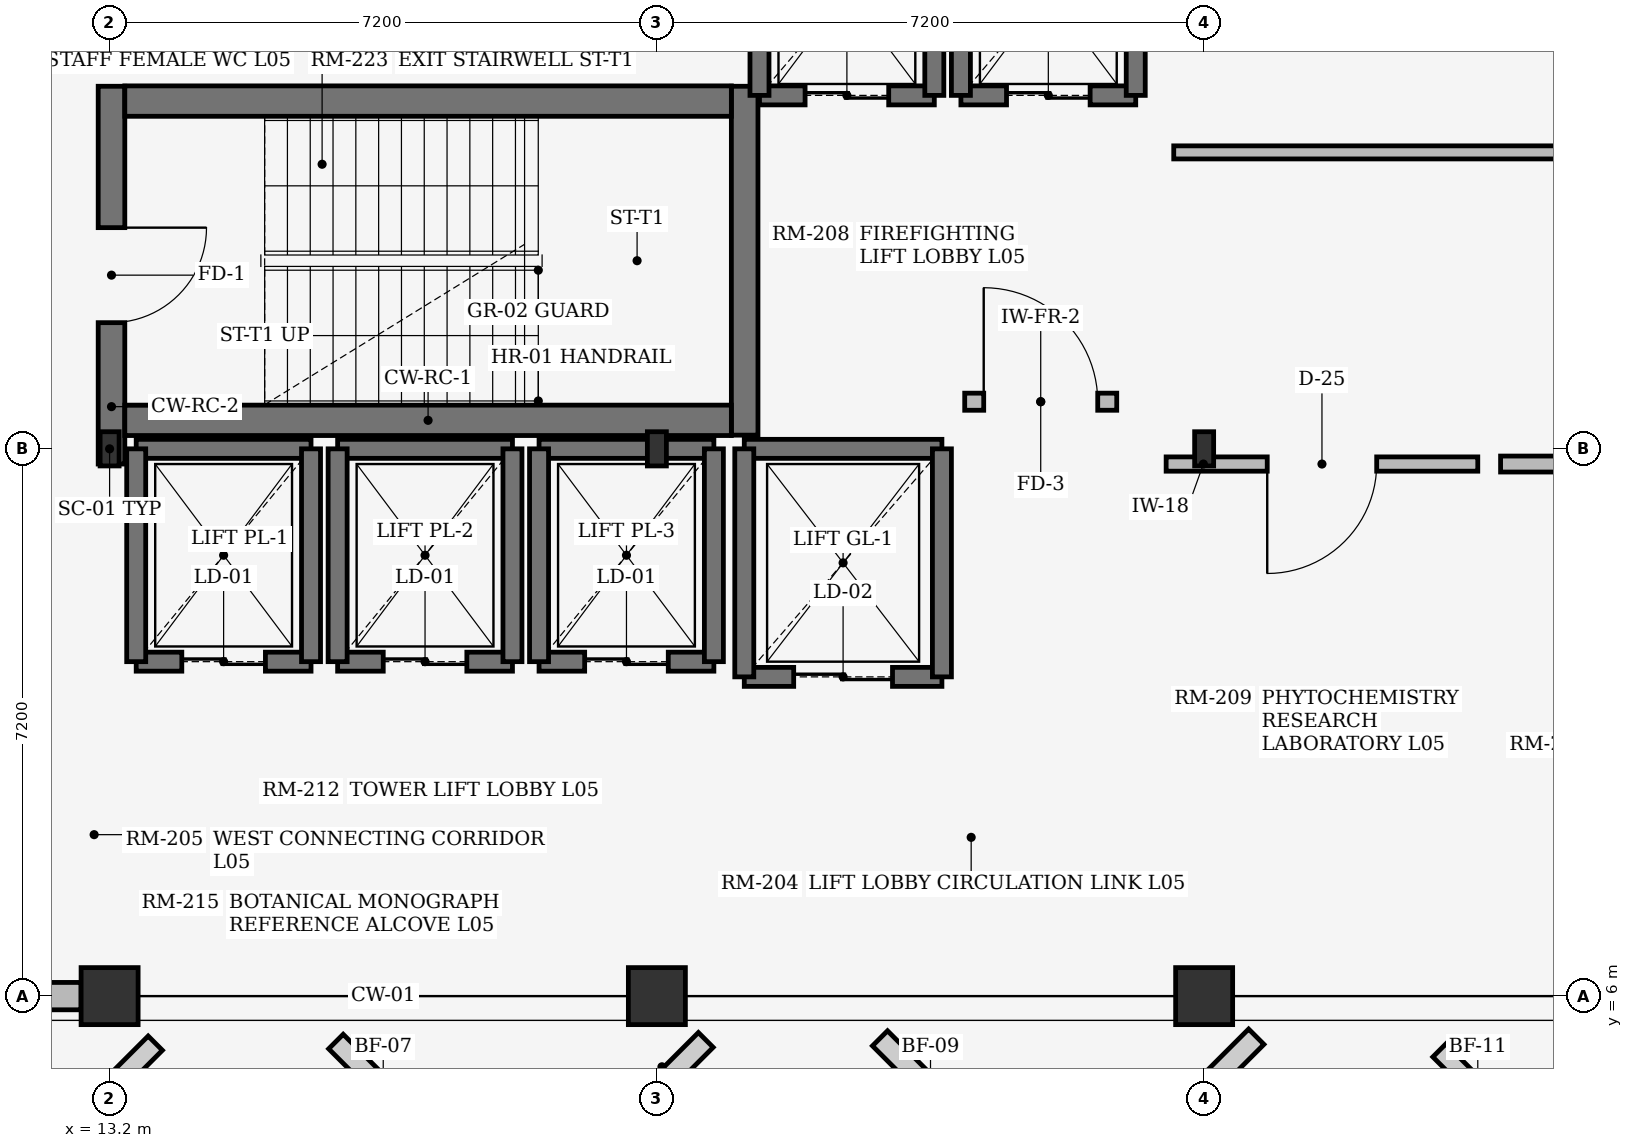
"""IFC4 building model, lengths in metres.
Left out: names, types, materials, properties, quantities, classifications, styles, units other than length and angle.
Written with IfcOpenShell. Run it as: python <this file> out.ifc"""

import sys

from ifc_helpers import new_model, si_unit, direction, frame, frame_2d, origin, origin_2d, place, context, subcontext, project, spatial, rectangle, i_section, extrude, element, fill, save


model = new_model("IFC4")
c1 = context("Model", 3, precision=1e-05, world=origin(), true_north=direction((0.0, 1.0)))
c2 = subcontext(c1, "Body", "Model", "MODEL_VIEW")
j1 = project(units=[si_unit("LENGTHUNIT", "METRE"), si_unit("PLANEANGLEUNIT", "RADIAN")], contexts=[c1])
p1 = place(None, origin())
s1 = spatial("IfcSite", under=j1, at=p1, CompositionType="ELEMENT")
p2 = place(p1, origin())
s2 = spatial("IfcBuilding", under=s1, at=p2, CompositionType="ELEMENT")
p3 = place(p2, frame((0.0, 0.0, 21.0)))
s3 = spatial("IfcBuildingStorey", under=s2, at=p3, CompositionType="ELEMENT", Elevation=21.0)
p4 = place(p3, frame((13.2, 6.0, 0.0), z_axis=(0.0, 0.0, 1.0), x_axis=(1.0, 0.0, 0.0)))
e1 = element("IfcColumn", 1, at=p4, inside=s3, PredefinedType="COLUMN", context=c2, shape_type="SweptSolid", body=[
    extrude(rectangle(XDim=0.75, YDim=0.75, at=origin_2d()), origin(), (0.0, 0.0, 1.0), 3.67),
])
p5 = place(p3, frame((13.2, 13.2, 0.0), z_axis=(0.0, 0.0, 1.0), x_axis=(1.0, 0.0, 0.0)))
e2 = element("IfcColumn", 2, at=p5, inside=s3, PredefinedType="COLUMN", context=c2, shape_type="SweptSolid", body=[
    extrude(i_section(OverallWidth=0.25, OverallDepth=0.45, WebThickness=0.011, FlangeThickness=0.014, at=origin_2d()), origin(), (0.0, 0.0, 1.0), 3.67),
])
p6 = place(p3, frame((20.4, 6.0, 0.0), z_axis=(0.0, 0.0, 1.0), x_axis=(1.0, 0.0, 0.0)))
e3 = element("IfcColumn", 3, at=p6, inside=s3, PredefinedType="COLUMN", context=c2, shape_type="SweptSolid", body=[
    extrude(rectangle(XDim=0.75, YDim=0.75, at=origin_2d()), origin(), (0.0, 0.0, 1.0), 3.67),
])
p7 = place(p3, frame((20.4, 13.2, 0.0), z_axis=(0.0, 0.0, 1.0), x_axis=(1.0, 0.0, 0.0)))
e4 = element("IfcColumn", 4, at=p7, inside=s3, PredefinedType="COLUMN", context=c2, shape_type="SweptSolid", body=[
    extrude(i_section(OverallWidth=0.25, OverallDepth=0.45, WebThickness=0.011, FlangeThickness=0.014, at=origin_2d()), origin(), (0.0, 0.0, 1.0), 3.67),
])
p8 = place(p3, frame((27.6, 6.0, 0.0), z_axis=(0.0, 0.0, 1.0), x_axis=(1.0, 0.0, 0.0)))
e5 = element("IfcColumn", 5, at=p8, inside=s3, PredefinedType="COLUMN", context=c2, shape_type="SweptSolid", body=[
    extrude(rectangle(XDim=0.75, YDim=0.75, at=origin_2d()), origin(), (0.0, 0.0, 1.0), 3.67),
])
p9 = place(p3, frame((27.6, 13.2, 0.0), z_axis=(0.0, 0.0, 1.0), x_axis=(1.0, 0.0, 0.0)))
e6 = element("IfcColumn", 6, at=p9, inside=s3, PredefinedType="COLUMN", context=c2, shape_type="SweptSolid", body=[
    extrude(i_section(OverallWidth=0.25, OverallDepth=0.45, WebThickness=0.011, FlangeThickness=0.014, at=origin_2d()), origin(), (0.0, 0.0, 1.0), 3.67),
])
p10 = place(p3, frame((6.375, 6.0, 0.0), z_axis=(0.0, 0.0, 1.0), x_axis=(1.0, 0.0, 0.0)))
e7 = element("IfcWall", 7, at=p10, inside=s3, PredefinedType="STANDARD", context=c2, shape_type="SweptSolid", body=[
    extrude(rectangle(XDim=6.45, YDim=0.36, at=frame_2d((3.225, 0.0))), origin(), (0.0, 0.0, 1.0), 3.05),
])
p11 = place(p10, frame((2.65, 0.0, 0.75)))
e8 = element("IfcOpeningElement", 8, at=p11, cuts=e7, PredefinedType="OPENING", context=c2, shape_type="SweptSolid", body=[
    extrude(rectangle(XDim=1.15, YDim=1.35, at=frame_2d((0.575, 0.675))), frame((0.0, 0.19, 0.0), z_axis=(0.0, -1.0, 0.0), x_axis=(1.0, 0.0, 0.0)), (0.0, 0.0, 1.0), 0.38),
])
p12 = place(p3, frame((13.225, 13.0, 0.0), z_axis=(0.0, 0.0, 1.0), x_axis=(0.0, 1.0, 0.0)))
e9 = element("IfcWall", 9, at=p12, inside=s3, PredefinedType="SHEAR", context=c2, shape_type="SweptSolid", body=[
    extrude(rectangle(XDim=4.97, YDim=0.35, at=frame_2d((2.485, 0.0))), origin(), (0.0, 0.0, 1.0), 3.67),
])
p13 = place(p12, frame((1.86, 0.0, 0.0)))
e10 = element("IfcOpeningElement", 10, at=p13, cuts=e9, PredefinedType="OPENING", context=c2, shape_type="SweptSolid", body=[
    extrude(rectangle(XDim=1.25, YDim=2.2, at=frame_2d((0.625, 1.1))), frame((0.0, 0.185, 0.0), z_axis=(0.0, -1.0, 0.0), x_axis=(1.0, 0.0, 0.0)), (0.0, 0.0, 1.0), 0.37),
])
p14 = place(p3, frame((21.555, 13.38, 0.0), z_axis=(0.0, 0.0, 1.0), x_axis=(0.0, 1.0, 0.0)))
e11 = element("IfcWall", 11, at=p14, inside=s3, PredefinedType="SHEAR", context=c2, shape_type="SweptSolid", body=[
    extrude(rectangle(XDim=4.59, YDim=0.35, at=frame_2d((2.295, 0.0))), origin(), (0.0, 0.0, 1.0), 3.67),
])
for number, where, z_axis, x_axis in (
    (12, (13.4, 13.575, 0.0), (0.0, 0.0, 1.0), (1.0, 0.0, 0.0)),
    (13, (13.4, 17.775, 0.0), (0.0, 0.0, 1.0), (1.0, 0.0, 0.0)),
):
    element("IfcWall", number, at=place(p3, frame(where, z_axis=z_axis, x_axis=x_axis)), inside=s3, PredefinedType="SHEAR", context=c2, shape_type="SweptSolid", body=[
        extrude(rectangle(XDim=7.98, YDim=0.4, at=frame_2d((3.99, 0.0))), origin(), (0.0, 0.0, 1.0), 3.67),
    ])
p15 = place(p3, frame((21.75, 17.85, 0.0), z_axis=(0.0, 0.0, 1.0), x_axis=(1.0, 0.0, 0.0)))
e14 = element("IfcWall", 14, at=p15, inside=s3, PredefinedType="SHEAR", context=c2, shape_type="SweptSolid", body=[
    extrude(rectangle(XDim=2.3, YDim=0.25, at=frame_2d((1.15, 0.0))), origin(), (0.0, 0.0, 1.0), 3.67),
])
p16 = place(p15, frame((0.6, 0.0, 0.0)))
e15 = element("IfcOpeningElement", 15, at=p16, cuts=e14, PredefinedType="OPENING", context=c2, shape_type="SweptSolid", body=[
    extrude(rectangle(XDim=1.1, YDim=2.2, at=frame_2d((0.55, 1.1))), frame((0.0, 0.135, 0.0), z_axis=(0.0, -1.0, 0.0), x_axis=(1.0, 0.0, 0.0)), (0.0, 0.0, 1.0), 0.27),
])
for number, where, z_axis, x_axis in (
    (16, (21.75, 17.85, 0.0), (0.0, 0.0, 1.0), (0.0, 1.0, 0.0)),
    (17, (24.05, 17.85, 0.0), (0.0, 0.0, 1.0), (0.0, 1.0, 0.0)),
):
    element("IfcWall", number, at=place(p3, frame(where, z_axis=z_axis, x_axis=x_axis)), inside=s3, PredefinedType="SHEAR", context=c2, shape_type="SweptSolid", body=[
        extrude(rectangle(XDim=2.7, YDim=0.25, at=frame_2d((1.35, 0.0))), origin(), (0.0, 0.0, 1.0), 3.67),
    ])
p17 = place(p3, frame((24.4, 17.85, 0.0), z_axis=(0.0, 0.0, 1.0), x_axis=(1.0, 0.0, 0.0)))
e18 = element("IfcWall", 18, at=p17, inside=s3, PredefinedType="SHEAR", context=c2, shape_type="SweptSolid", body=[
    extrude(rectangle(XDim=2.3, YDim=0.25, at=frame_2d((1.15, 0.0))), origin(), (0.0, 0.0, 1.0), 3.67),
])
p18 = place(p17, frame((0.6, 0.0, 0.0)))
e19 = element("IfcOpeningElement", 19, at=p18, cuts=e18, PredefinedType="OPENING", context=c2, shape_type="SweptSolid", body=[
    extrude(rectangle(XDim=1.1, YDim=2.2, at=frame_2d((0.55, 1.1))), frame((0.0, 0.135, 0.0), z_axis=(0.0, -1.0, 0.0), x_axis=(1.0, 0.0, 0.0)), (0.0, 0.0, 1.0), 0.27),
])
for number, where, z_axis, x_axis in (
    (20, (24.4, 17.85, 0.0), (0.0, 0.0, 1.0), (0.0, 1.0, 0.0)),
    (21, (26.7, 17.85, 0.0), (0.0, 0.0, 1.0), (0.0, 1.0, 0.0)),
):
    element("IfcWall", number, at=place(p3, frame(where, z_axis=z_axis, x_axis=x_axis)), inside=s3, PredefinedType="SHEAR", context=c2, shape_type="SweptSolid", body=[
        extrude(rectangle(XDim=2.7, YDim=0.25, at=frame_2d((1.35, 0.0))), origin(), (0.0, 0.0, 1.0), 3.67),
    ])
p19 = place(p3, frame((13.55, 10.4, 0.0), z_axis=(0.0, 0.0, 1.0), x_axis=(1.0, 0.0, 0.0)))
e22 = element("IfcWall", 22, at=p19, inside=s3, PredefinedType="SHEAR", context=c2, shape_type="SweptSolid", body=[
    extrude(rectangle(XDim=2.3, YDim=0.25, at=frame_2d((1.15, 0.0))), origin(), (0.0, 0.0, 1.0), 3.67),
])
p20 = place(p19, frame((0.6, 0.0, 0.0)))
e23 = element("IfcOpeningElement", 23, at=p20, cuts=e22, PredefinedType="OPENING", context=c2, shape_type="SweptSolid", body=[
    extrude(rectangle(XDim=1.1, YDim=2.2, at=frame_2d((0.55, 1.1))), frame((0.0, 0.135, 0.0), z_axis=(0.0, -1.0, 0.0), x_axis=(1.0, 0.0, 0.0)), (0.0, 0.0, 1.0), 0.27),
])
p21 = place(p3, frame((13.55, 13.2, 0.0), z_axis=(0.0, 0.0, 1.0), x_axis=(1.0, 0.0, 0.0)))
e24 = element("IfcWall", 24, at=p21, inside=s3, PredefinedType="SHEAR", context=c2, shape_type="SweptSolid", body=[
    extrude(rectangle(XDim=2.3, YDim=0.25, at=frame_2d((1.15, 0.0))), origin(), (0.0, 0.0, 1.0), 3.67),
])
for number, where, z_axis, x_axis in (
    (25, (13.55, 10.4, 0.0), (0.0, 0.0, 1.0), (0.0, 1.0, 0.0)),
    (26, (15.85, 10.4, 0.0), (0.0, 0.0, 1.0), (0.0, 1.0, 0.0)),
):
    element("IfcWall", number, at=place(p3, frame(where, z_axis=z_axis, x_axis=x_axis)), inside=s3, PredefinedType="SHEAR", context=c2, shape_type="SweptSolid", body=[
        extrude(rectangle(XDim=2.8, YDim=0.25, at=frame_2d((1.4, 0.0))), origin(), (0.0, 0.0, 1.0), 3.67),
    ])
p22 = place(p3, frame((16.2, 10.4, 0.0), z_axis=(0.0, 0.0, 1.0), x_axis=(1.0, 0.0, 0.0)))
e27 = element("IfcWall", 27, at=p22, inside=s3, PredefinedType="SHEAR", context=c2, shape_type="SweptSolid", body=[
    extrude(rectangle(XDim=2.3, YDim=0.25, at=frame_2d((1.15, 0.0))), origin(), (0.0, 0.0, 1.0), 3.67),
])
p23 = place(p22, frame((0.6, 0.0, 0.0)))
e28 = element("IfcOpeningElement", 28, at=p23, cuts=e27, PredefinedType="OPENING", context=c2, shape_type="SweptSolid", body=[
    extrude(rectangle(XDim=1.1, YDim=2.2, at=frame_2d((0.55, 1.1))), frame((0.0, 0.135, 0.0), z_axis=(0.0, -1.0, 0.0), x_axis=(1.0, 0.0, 0.0)), (0.0, 0.0, 1.0), 0.27),
])
p24 = place(p3, frame((16.2, 13.2, 0.0), z_axis=(0.0, 0.0, 1.0), x_axis=(1.0, 0.0, 0.0)))
e29 = element("IfcWall", 29, at=p24, inside=s3, PredefinedType="SHEAR", context=c2, shape_type="SweptSolid", body=[
    extrude(rectangle(XDim=2.3, YDim=0.25, at=frame_2d((1.15, 0.0))), origin(), (0.0, 0.0, 1.0), 3.67),
])
for number, where, z_axis, x_axis in (
    (30, (16.2, 10.4, 0.0), (0.0, 0.0, 1.0), (0.0, 1.0, 0.0)),
    (31, (18.5, 10.4, 0.0), (0.0, 0.0, 1.0), (0.0, 1.0, 0.0)),
):
    element("IfcWall", number, at=place(p3, frame(where, z_axis=z_axis, x_axis=x_axis)), inside=s3, PredefinedType="SHEAR", context=c2, shape_type="SweptSolid", body=[
        extrude(rectangle(XDim=2.8, YDim=0.25, at=frame_2d((1.4, 0.0))), origin(), (0.0, 0.0, 1.0), 3.67),
    ])
p25 = place(p3, frame((18.85, 10.4, 0.0), z_axis=(0.0, 0.0, 1.0), x_axis=(1.0, 0.0, 0.0)))
e32 = element("IfcWall", 32, at=p25, inside=s3, PredefinedType="SHEAR", context=c2, shape_type="SweptSolid", body=[
    extrude(rectangle(XDim=2.3, YDim=0.25, at=frame_2d((1.15, 0.0))), origin(), (0.0, 0.0, 1.0), 3.67),
])
p26 = place(p25, frame((0.6, 0.0, 0.0)))
e33 = element("IfcOpeningElement", 33, at=p26, cuts=e32, PredefinedType="OPENING", context=c2, shape_type="SweptSolid", body=[
    extrude(rectangle(XDim=1.1, YDim=2.2, at=frame_2d((0.55, 1.1))), frame((0.0, 0.135, 0.0), z_axis=(0.0, -1.0, 0.0), x_axis=(1.0, 0.0, 0.0)), (0.0, 0.0, 1.0), 0.27),
])
p27 = place(p3, frame((18.85, 13.2, 0.0), z_axis=(0.0, 0.0, 1.0), x_axis=(1.0, 0.0, 0.0)))
e34 = element("IfcWall", 34, at=p27, inside=s3, PredefinedType="SHEAR", context=c2, shape_type="SweptSolid", body=[
    extrude(rectangle(XDim=2.3, YDim=0.25, at=frame_2d((1.15, 0.0))), origin(), (0.0, 0.0, 1.0), 3.67),
])
for number, where, z_axis, x_axis in (
    (35, (18.85, 10.4, 0.0), (0.0, 0.0, 1.0), (0.0, 1.0, 0.0)),
    (36, (21.15, 10.4, 0.0), (0.0, 0.0, 1.0), (0.0, 1.0, 0.0)),
):
    element("IfcWall", number, at=place(p3, frame(where, z_axis=z_axis, x_axis=x_axis)), inside=s3, PredefinedType="SHEAR", context=c2, shape_type="SweptSolid", body=[
        extrude(rectangle(XDim=2.8, YDim=0.25, at=frame_2d((1.4, 0.0))), origin(), (0.0, 0.0, 1.0), 3.67),
    ])
p28 = place(p3, frame((21.55, 10.2, 0.0), z_axis=(0.0, 0.0, 1.0), x_axis=(1.0, 0.0, 0.0)))
e37 = element("IfcWall", 37, at=p28, inside=s3, PredefinedType="SHEAR", context=c2, shape_type="SweptSolid", body=[
    extrude(rectangle(XDim=2.6, YDim=0.25, at=frame_2d((1.3, 0.0))), origin(), (0.0, 0.0, 1.0), 3.67),
])
p29 = place(p28, frame((0.65, 0.0, 0.0)))
e38 = element("IfcOpeningElement", 38, at=p29, cuts=e37, PredefinedType="OPENING", context=c2, shape_type="SweptSolid", body=[
    extrude(rectangle(XDim=1.3, YDim=2.25, at=frame_2d((0.65, 1.125))), frame((0.0, 0.135, 0.0), z_axis=(0.0, -1.0, 0.0), x_axis=(1.0, 0.0, 0.0)), (0.0, 0.0, 1.0), 0.27),
])
p30 = place(p3, frame((21.55, 13.2, 0.0), z_axis=(0.0, 0.0, 1.0), x_axis=(1.0, 0.0, 0.0)))
e39 = element("IfcWall", 39, at=p30, inside=s3, PredefinedType="SHEAR", context=c2, shape_type="SweptSolid", body=[
    extrude(rectangle(XDim=2.6, YDim=0.25, at=frame_2d((1.3, 0.0))), origin(), (0.0, 0.0, 1.0), 3.67),
])
for number, where, z_axis, x_axis in (
    (40, (21.55, 10.2, 0.0), (0.0, 0.0, 1.0), (0.0, 1.0, 0.0)),
    (41, (24.15, 10.2, 0.0), (0.0, 0.0, 1.0), (0.0, 1.0, 0.0)),
):
    element("IfcWall", number, at=place(p3, frame(where, z_axis=z_axis, x_axis=x_axis)), inside=s3, PredefinedType="SHEAR", context=c2, shape_type="SweptSolid", body=[
        extrude(rectangle(XDim=3.0, YDim=0.25, at=frame_2d((1.5, 0.0))), origin(), (0.0, 0.0, 1.0), 3.67),
    ])
p31 = place(p3, frame((24.45, 13.82, 0.0), z_axis=(0.0, 0.0, 1.0), x_axis=(1.0, 0.0, 0.0)))
e42 = element("IfcWall", 42, at=p31, inside=s3, PredefinedType="SOLIDWALL", context=c2, shape_type="SweptSolid", body=[
    extrude(rectangle(XDim=2.0, YDim=0.225, at=frame_2d((1.0, 0.0))), origin(), (0.0, 0.0, 1.0), 3.65),
])
p32 = place(p31, frame((0.25, 0.0, 0.0)))
e43 = element("IfcOpeningElement", 43, at=p32, cuts=e42, PredefinedType="OPENING", context=c2, shape_type="SweptSolid", body=[
    extrude(rectangle(XDim=1.5, YDim=2.2, at=frame_2d((0.75, 1.1))), frame((0.0, 0.123, 0.0), z_axis=(0.0, -1.0, 0.0), x_axis=(1.0, 0.0, 0.0)), (0.0, 0.0, 1.0), 0.245),
])
p33 = place(p3, frame((27.2, 17.1, 0.0), z_axis=(0.0, 0.0, 1.0), x_axis=(1.0, 0.0, 0.0)))
e44 = element("IfcWall", 44, at=p33, inside=s3, PredefinedType="PARTITIONING", context=c2, shape_type="SweptSolid", body=[
    extrude(rectangle(XDim=14.25, YDim=0.172, at=frame_2d((7.125, 0.0))), origin(), (0.0, 0.0, 1.0), 3.65),
])
p34 = place(p33, frame((6.455, 0.0, 0.0)))
e45 = element("IfcOpeningElement", 45, at=p34, cuts=e44, PredefinedType="OPENING", context=c2, shape_type="SweptSolid", body=[
    extrude(rectangle(XDim=1.34, YDim=2.22, at=frame_2d((0.67, 1.11))), frame((0.0, 0.096, 0.0), z_axis=(0.0, -1.0, 0.0), x_axis=(1.0, 0.0, 0.0)), (0.0, 0.0, 1.0), 0.192),
])
p35 = place(p3, frame((27.1, 13.0, 0.0), z_axis=(0.0, 0.0, 1.0), x_axis=(1.0, 0.0, 0.0)))
e46 = element("IfcWall", 46, at=p35, inside=s3, PredefinedType="PARTITIONING", context=c2, shape_type="SweptSolid", body=[
    extrude(rectangle(XDim=4.1, YDim=0.188, at=frame_2d((2.05, 0.0))), origin(), (0.0, 0.0, 1.0), 3.65),
])
p36 = place(p35, frame((1.33, 0.0, 0.0)))
e47 = element("IfcOpeningElement", 47, at=p36, cuts=e46, PredefinedType="OPENING", context=c2, shape_type="SweptSolid", body=[
    extrude(rectangle(XDim=1.44, YDim=2.24, at=frame_2d((0.72, 1.12))), frame((0.0, 0.104, 0.0), z_axis=(0.0, -1.0, 0.0), x_axis=(1.0, 0.0, 0.0)), (0.0, 0.0, 1.0), 0.208),
])
p37 = place(p3, frame((31.5, 13.0, 0.0), z_axis=(0.0, 0.0, 1.0), x_axis=(1.0, 0.0, 0.0)))
e48 = element("IfcWall", 48, at=p37, inside=s3, PredefinedType="PARTITIONING", context=c2, shape_type="SweptSolid", body=[
    extrude(rectangle(XDim=9.95, YDim=0.21, at=frame_2d((4.975, 0.0))), origin(), (0.0, 0.0, 1.0), 3.06),
])
p38 = place(p37, frame((4.215, 0.0, 0.0)))
e49 = element("IfcOpeningElement", 49, at=p38, cuts=e48, PredefinedType="OPENING", context=c2, shape_type="SweptSolid", body=[
    extrude(rectangle(XDim=1.52, YDim=2.26, at=frame_2d((0.76, 1.13))), frame((0.0, 0.115, 0.0), z_axis=(0.0, -1.0, 0.0), x_axis=(1.0, 0.0, 0.0)), (0.0, 0.0, 1.0), 0.23),
])
p39 = place(p13, origin())
e50 = element("IfcDoor", 50, at=p39, inside=s3, OperationType="SINGLE_SWING_RIGHT", PredefinedType="DOOR", context=c2, shape_type="SweptSolid", body=[
    extrude(rectangle(XDim=1.25, YDim=2.2, at=frame_2d((0.625, 1.1))), frame((0.0, 0.025, 0.0), z_axis=(0.0, -1.0, 0.0), x_axis=(1.0, 0.0, 0.0)), (0.0, 0.0, 1.0), 0.05),
])
fill(e10, e50)
p40 = place(p16, origin())
e51 = element("IfcDoor", 51, at=p40, inside=s3, OperationType="DOUBLE_DOOR_SLIDING", PredefinedType="DOOR", context=c2, shape_type="SweptSolid", body=[
    extrude(rectangle(XDim=1.1, YDim=2.2, at=frame_2d((0.55, 1.1))), frame((0.0, 0.025, 0.0), z_axis=(0.0, -1.0, 0.0), x_axis=(1.0, 0.0, 0.0)), (0.0, 0.0, 1.0), 0.05),
])
fill(e15, e51)
p41 = place(p18, origin())
e52 = element("IfcDoor", 52, at=p41, inside=s3, OperationType="DOUBLE_DOOR_SLIDING", PredefinedType="DOOR", context=c2, shape_type="SweptSolid", body=[
    extrude(rectangle(XDim=1.1, YDim=2.2, at=frame_2d((0.55, 1.1))), frame((0.0, 0.025, 0.0), z_axis=(0.0, -1.0, 0.0), x_axis=(1.0, 0.0, 0.0)), (0.0, 0.0, 1.0), 0.05),
])
fill(e19, e52)
p42 = place(p20, origin())
e53 = element("IfcDoor", 53, at=p42, inside=s3, OperationType="DOUBLE_DOOR_SLIDING", PredefinedType="DOOR", context=c2, shape_type="SweptSolid", body=[
    extrude(rectangle(XDim=1.1, YDim=2.2, at=frame_2d((0.55, 1.1))), frame((0.0, 0.025, 0.0), z_axis=(0.0, -1.0, 0.0), x_axis=(1.0, 0.0, 0.0)), (0.0, 0.0, 1.0), 0.05),
])
fill(e23, e53)
p43 = place(p23, origin())
e54 = element("IfcDoor", 54, at=p43, inside=s3, OperationType="DOUBLE_DOOR_SLIDING", PredefinedType="DOOR", context=c2, shape_type="SweptSolid", body=[
    extrude(rectangle(XDim=1.1, YDim=2.2, at=frame_2d((0.55, 1.1))), frame((0.0, 0.025, 0.0), z_axis=(0.0, -1.0, 0.0), x_axis=(1.0, 0.0, 0.0)), (0.0, 0.0, 1.0), 0.05),
])
fill(e28, e54)
p44 = place(p26, origin())
e55 = element("IfcDoor", 55, at=p44, inside=s3, OperationType="DOUBLE_DOOR_SLIDING", PredefinedType="DOOR", context=c2, shape_type="SweptSolid", body=[
    extrude(rectangle(XDim=1.1, YDim=2.2, at=frame_2d((0.55, 1.1))), frame((0.0, 0.025, 0.0), z_axis=(0.0, -1.0, 0.0), x_axis=(1.0, 0.0, 0.0)), (0.0, 0.0, 1.0), 0.05),
])
fill(e33, e55)
p45 = place(p29, origin())
e56 = element("IfcDoor", 56, at=p45, inside=s3, OperationType="DOUBLE_DOOR_SLIDING", PredefinedType="DOOR", context=c2, shape_type="SweptSolid", body=[
    extrude(rectangle(XDim=1.3, YDim=2.25, at=frame_2d((0.65, 1.125))), frame((0.0, 0.025, 0.0), z_axis=(0.0, -1.0, 0.0), x_axis=(1.0, 0.0, 0.0)), (0.0, 0.0, 1.0), 0.05),
])
fill(e38, e56)
p46 = place(p32, origin())
e57 = element("IfcDoor", 57, at=p46, inside=s3, OperationType="SINGLE_SWING_LEFT", PredefinedType="DOOR", context=c2, shape_type="SweptSolid", body=[
    extrude(rectangle(XDim=1.5, YDim=2.2, at=frame_2d((0.75, 1.1))), frame((0.0, 0.025, 0.0), z_axis=(0.0, -1.0, 0.0), x_axis=(1.0, 0.0, 0.0)), (0.0, 0.0, 1.0), 0.05),
])
fill(e43, e57)
p47 = place(p36, frame((1.44, 0.0, 0.0), z_axis=(0.0, 0.0, 1.0), x_axis=(-1.0, 0.0, 0.0)))
e58 = element("IfcDoor", 58, at=p47, inside=s3, OperationType="SINGLE_SWING_LEFT", PredefinedType="DOOR", context=c2, shape_type="SweptSolid", body=[
    extrude(rectangle(XDim=1.44, YDim=2.24, at=frame_2d((0.72, 1.12))), frame((0.0, 0.025, 0.0), z_axis=(0.0, -1.0, 0.0), x_axis=(1.0, 0.0, 0.0)), (0.0, 0.0, 1.0), 0.05),
])
fill(e47, e58)
save(model, sys.argv[1])
